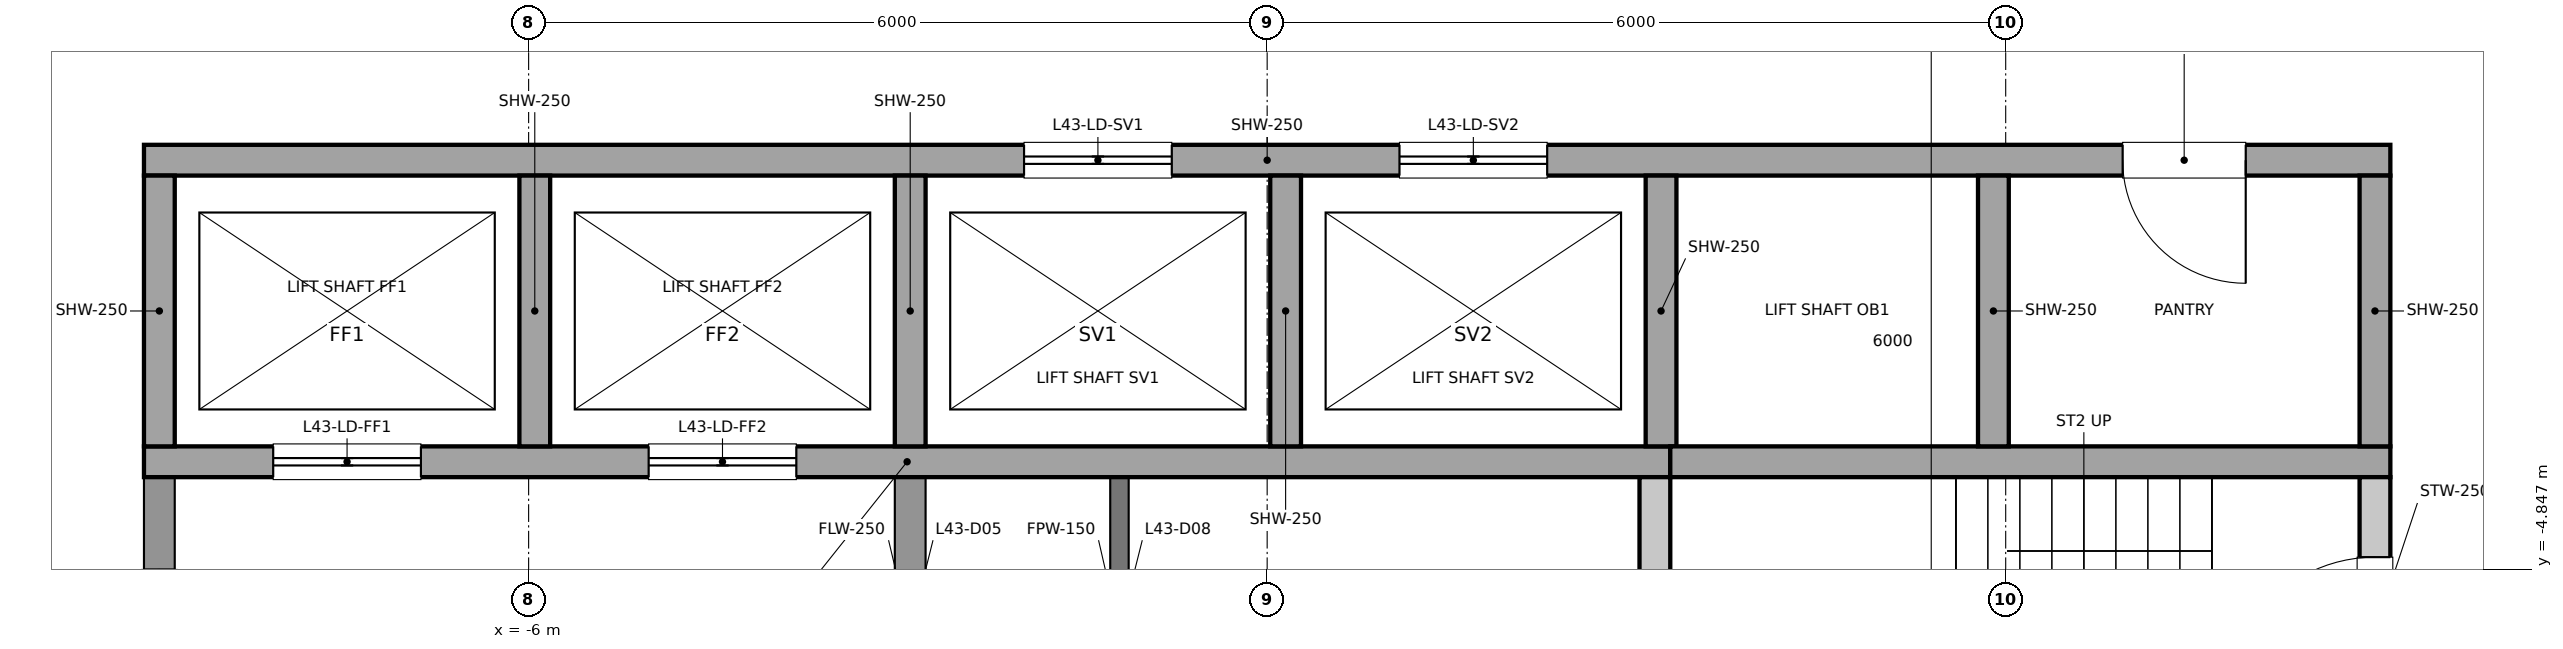
"""IFC4 building model, lengths in metres.
Left out: names, types, materials, properties, quantities, classifications, styles, units other than length and angle.
Written with IfcOpenShell. Run it as: python <this file> out.ifc"""

import sys

from ifc_helpers import new_model, si_unit, direction, frame, frame_2d, origin, place, context, subcontext, project, spatial, rectangle, extrude, element, fill, save


model = new_model("IFC4")
c1 = context("Model", 3, precision=1e-05, world=origin(), true_north=direction((0.0, 1.0)))
c2 = subcontext(c1, "Body", "Model", "MODEL_VIEW")
j1 = project(units=[si_unit("LENGTHUNIT", "METRE"), si_unit("PLANEANGLEUNIT", "RADIAN")], contexts=[c1])
p1 = place(None, origin())
s1 = spatial("IfcSite", under=j1, at=p1, CompositionType="ELEMENT")
p2 = place(p1, origin())
s2 = spatial("IfcBuilding", under=s1, at=p2, CompositionType="ELEMENT")
p3 = place(p2, frame((0.0, 0.0, 203.0)))
s3 = spatial("IfcBuildingStorey", under=s2, at=p3, CompositionType="ELEMENT", Elevation=203.0)
p4 = place(p3, frame((-1.2, -6.6, 0.0), z_axis=(0.0, 0.0, 1.0), x_axis=(0.0, 1.0, 0.0)))
e1 = element("IfcWall", 1, at=p4, inside=s3, PredefinedType="PARTITIONING", context=c2, shape_type="SweptSolid", body=[
    extrude(rectangle(XDim=2.5, YDim=0.15, at=frame_2d((1.25, 0.0))), origin(), (0.0, 0.0, 1.0), 5.7),
])
p5 = place(p4, frame((0.8, 0.0, 0.0)))
e2 = element("IfcOpeningElement", 2, at=p5, cuts=e1, PredefinedType="OPENING", context=c2, shape_type="SweptSolid", body=[
    extrude(rectangle(XDim=0.9, YDim=2.1, at=frame_2d((0.45, 1.05))), frame((0.0, 0.075, 0.0), z_axis=(0.0, -1.0, 0.0), x_axis=(1.0, 0.0, 0.0)), (0.0, 0.0, 1.0), 0.15),
])
p6 = place(p3, frame((9.0, -6.6, 0.0), z_axis=(0.0, 0.0, 1.0), x_axis=(0.0, 1.0, 0.0)))
e3 = element("IfcWall", 3, at=p6, inside=s3, PredefinedType="SOLIDWALL", context=c2, shape_type="SweptSolid", body=[
    extrude(rectangle(XDim=2.5, YDim=0.25, at=frame_2d((1.25, 0.0))), origin(), (0.0, 0.0, 1.0), 5.7),
])
p7 = place(p6, frame((0.65, 0.0, 0.0)))
e4 = element("IfcOpeningElement", 4, at=p7, cuts=e3, PredefinedType="OPENING", context=c2, shape_type="SweptSolid", body=[
    extrude(rectangle(XDim=1.2, YDim=2.1, at=frame_2d((0.6, 1.05))), frame((0.0, 0.125, 0.0), z_axis=(0.0, -1.0, 0.0), x_axis=(1.0, 0.0, 0.0)), (0.0, 0.0, 1.0), 0.25),
])
p8 = place(p3, frame((-9.0, -6.6, 0.0), z_axis=(0.0, 0.0, 1.0), x_axis=(0.0, 1.0, 0.0)))
e5 = element("IfcWall", 5, at=p8, inside=s3, PredefinedType="PARTITIONING", context=c2, shape_type="SweptSolid", body=[
    extrude(rectangle(XDim=2.5, YDim=0.25, at=frame_2d((1.25, 0.0))), origin(), (0.0, 0.0, 1.0), 5.7),
])
p9 = place(p8, frame((0.75, 0.0, 0.0)))
e6 = element("IfcOpeningElement", 6, at=p9, cuts=e5, PredefinedType="OPENING", context=c2, shape_type="SweptSolid", body=[
    extrude(rectangle(XDim=1.0, YDim=2.1, at=frame_2d((0.5, 1.05))), frame((0.0, 0.125, 0.0), z_axis=(0.0, -1.0, 0.0), x_axis=(1.0, 0.0, 0.0)), (0.0, 0.0, 1.0), 0.25),
])
p10 = place(p3, frame((3.15, -6.6, 0.0), z_axis=(0.0, 0.0, 1.0), x_axis=(0.0, 1.0, 0.0)))
e7 = element("IfcWall", 7, at=p10, inside=s3, PredefinedType="SOLIDWALL", context=c2, shape_type="SweptSolid", body=[
    extrude(rectangle(XDim=2.5, YDim=0.25, at=frame_2d((1.25, 0.0))), origin(), (0.0, 0.0, 1.0), 5.7),
])
p11 = place(p3, frame((-2.9, -6.6, 0.0), z_axis=(0.0, 0.0, 1.0), x_axis=(0.0, 1.0, 0.0)))
e8 = element("IfcWall", 8, at=p11, inside=s3, PredefinedType="PARTITIONING", context=c2, shape_type="SweptSolid", body=[
    extrude(rectangle(XDim=2.5, YDim=0.25, at=frame_2d((1.25, 0.0))), origin(), (0.0, 0.0, 1.0), 5.7),
])
p12 = place(p11, frame((0.8, 0.0, 0.0)))
e9 = element("IfcOpeningElement", 9, at=p12, cuts=e8, PredefinedType="OPENING", context=c2, shape_type="SweptSolid", body=[
    extrude(rectangle(XDim=0.9, YDim=2.1, at=frame_2d((0.45, 1.05))), frame((0.0, 0.125, 0.0), z_axis=(0.0, -1.0, 0.0), x_axis=(1.0, 0.0, 0.0)), (0.0, 0.0, 1.0), 0.25),
])
p13 = place(p3, frame((-9.125, -1.525, 0.0), z_axis=(0.0, 0.0, 1.0), x_axis=(1.0, 0.0, 0.0)))
e10 = element("IfcWall", 10, at=p13, inside=s3, PredefinedType="SOLIDWALL", context=c2, shape_type="SweptSolid", body=[
    extrude(rectangle(XDim=18.25, YDim=0.25, at=frame_2d((9.125, 0.0))), origin(), (0.0, 0.0, 1.0), 5.7),
])
p14 = place(p13, frame((7.15, 0.0, 0.0)))
e11 = element("IfcOpeningElement", 11, at=p14, cuts=e10, PredefinedType="OPENING", context=c2, shape_type="SweptSolid", body=[
    extrude(rectangle(XDim=1.2, YDim=2.1, at=frame_2d((0.6, 1.05))), frame((0.0, 0.125, 0.0), z_axis=(0.0, -1.0, 0.0), x_axis=(1.0, 0.0, 0.0)), (0.0, 0.0, 1.0), 0.25),
])
p15 = place(p13, frame((10.2, 0.0, 0.0)))
e12 = element("IfcOpeningElement", 12, at=p15, cuts=e10, PredefinedType="OPENING", context=c2, shape_type="SweptSolid", body=[
    extrude(rectangle(XDim=1.2, YDim=2.1, at=frame_2d((0.6, 1.05))), frame((0.0, 0.125, 0.0), z_axis=(0.0, -1.0, 0.0), x_axis=(1.0, 0.0, 0.0)), (0.0, 0.0, 1.0), 0.25),
])
p16 = place(p13, frame((16.075, 0.0, 0.0)))
e13 = element("IfcOpeningElement", 13, at=p16, cuts=e10, PredefinedType="OPENING", context=c2, shape_type="SweptSolid", body=[
    extrude(rectangle(XDim=1.0, YDim=2.1, at=frame_2d((0.5, 1.05))), frame((0.0, 0.125, 0.0), z_axis=(0.0, -1.0, 0.0), x_axis=(1.0, 0.0, 0.0)), (0.0, 0.0, 1.0), 0.25),
])
p17 = place(p3, frame((-9.125, -3.975, 0.0), z_axis=(0.0, 0.0, 1.0), x_axis=(1.0, 0.0, 0.0)))
e14 = element("IfcWall", 14, at=p17, inside=s3, PredefinedType="SOLIDWALL", context=c2, shape_type="SweptSolid", body=[
    extrude(rectangle(XDim=12.4, YDim=0.25, at=frame_2d((6.2, 0.0))), origin(), (0.0, 0.0, 1.0), 5.7),
])
p18 = place(p17, frame((1.05, 0.0, 0.0)))
e15 = element("IfcOpeningElement", 15, at=p18, cuts=e14, PredefinedType="OPENING", context=c2, shape_type="SweptSolid", body=[
    extrude(rectangle(XDim=1.2, YDim=2.1, at=frame_2d((0.6, 1.05))), frame((0.0, 0.125, 0.0), z_axis=(0.0, -1.0, 0.0), x_axis=(1.0, 0.0, 0.0)), (0.0, 0.0, 1.0), 0.25),
])
p19 = place(p17, frame((4.1, 0.0, 0.0)))
e16 = element("IfcOpeningElement", 16, at=p19, cuts=e14, PredefinedType="OPENING", context=c2, shape_type="SweptSolid", body=[
    extrude(rectangle(XDim=1.2, YDim=2.1, at=frame_2d((0.6, 1.05))), frame((0.0, 0.125, 0.0), z_axis=(0.0, -1.0, 0.0), x_axis=(1.0, 0.0, 0.0)), (0.0, 0.0, 1.0), 0.25),
])
p20 = place(p3, frame((3.275, -3.975, 0.0), z_axis=(0.0, 0.0, 1.0), x_axis=(1.0, 0.0, 0.0)))
e17 = element("IfcWall", 17, at=p20, inside=s3, PredefinedType="SOLIDWALL", context=c2, shape_type="SweptSolid", body=[
    extrude(rectangle(XDim=5.85, YDim=0.25, at=frame_2d((2.925, 0.0))), origin(), (0.0, 0.0, 1.0), 5.7),
])
for number, where, z_axis, x_axis in (
    (18, (-9.0, -3.85, 0.0), (0.0, 0.0, 1.0), (0.0, 1.0, 0.0)),
    (19, (-5.95, -3.85, 0.0), (0.0, 0.0, 1.0), (0.0, 1.0, 0.0)),
    (20, (-2.9, -3.85, 0.0), (0.0, 0.0, 1.0), (0.0, 1.0, 0.0)),
    (21, (0.15, -3.85, 0.0), (0.0, 0.0, 1.0), (0.0, 1.0, 0.0)),
    (22, (3.2, -3.85, 0.0), (0.0, 0.0, 1.0), (0.0, 1.0, 0.0)),
    (23, (5.9, -3.85, 0.0), (0.0, 0.0, 1.0), (0.0, 1.0, 0.0)),
    (24, (9.0, -3.85, 0.0), (0.0, 0.0, 1.0), (0.0, 1.0, 0.0)),
):
    element("IfcWall", number, at=place(p3, frame(where, z_axis=z_axis, x_axis=x_axis)), inside=s3, PredefinedType="SOLIDWALL", context=c2, shape_type="SweptSolid", body=[
        extrude(rectangle(XDim=2.2, YDim=0.25, at=frame_2d((1.1, 0.0))), origin(), (0.0, 0.0, 1.0), 5.7),
    ])
p21 = place(p18, origin())
e25 = element("IfcDoor", 25, at=p21, inside=s3, OperationType="DOUBLE_DOOR_SLIDING", PredefinedType="DOOR", context=c2, shape_type="SweptSolid", body=[
    extrude(rectangle(XDim=1.2, YDim=2.1, at=frame_2d((0.6, 1.05))), frame((0.0, 0.025, 0.0), z_axis=(0.0, -1.0, 0.0), x_axis=(1.0, 0.0, 0.0)), (0.0, 0.0, 1.0), 0.05),
])
fill(e15, e25)
p22 = place(p19, origin())
e26 = element("IfcDoor", 26, at=p22, inside=s3, OperationType="DOUBLE_DOOR_SLIDING", PredefinedType="DOOR", context=c2, shape_type="SweptSolid", body=[
    extrude(rectangle(XDim=1.2, YDim=2.1, at=frame_2d((0.6, 1.05))), frame((0.0, 0.025, 0.0), z_axis=(0.0, -1.0, 0.0), x_axis=(1.0, 0.0, 0.0)), (0.0, 0.0, 1.0), 0.05),
])
fill(e16, e26)
p23 = place(p14, origin())
e27 = element("IfcDoor", 27, at=p23, inside=s3, OperationType="DOUBLE_DOOR_SLIDING", PredefinedType="DOOR", context=c2, shape_type="SweptSolid", body=[
    extrude(rectangle(XDim=1.2, YDim=2.1, at=frame_2d((0.6, 1.05))), frame((0.0, 0.025, 0.0), z_axis=(0.0, -1.0, 0.0), x_axis=(1.0, 0.0, 0.0)), (0.0, 0.0, 1.0), 0.05),
])
fill(e11, e27)
p24 = place(p15, origin())
e28 = element("IfcDoor", 28, at=p24, inside=s3, OperationType="DOUBLE_DOOR_SLIDING", PredefinedType="DOOR", context=c2, shape_type="SweptSolid", body=[
    extrude(rectangle(XDim=1.2, YDim=2.1, at=frame_2d((0.6, 1.05))), frame((0.0, 0.025, 0.0), z_axis=(0.0, -1.0, 0.0), x_axis=(1.0, 0.0, 0.0)), (0.0, 0.0, 1.0), 0.05),
])
fill(e12, e28)
p25 = place(p7, origin())
e29 = element("IfcDoor", 29, at=p25, inside=s3, OperationType="SINGLE_SWING_LEFT", PredefinedType="DOOR", context=c2, shape_type="SweptSolid", body=[
    extrude(rectangle(XDim=1.2, YDim=2.1, at=frame_2d((0.6, 1.05))), frame((0.0, 0.025, 0.0), z_axis=(0.0, -1.0, 0.0), x_axis=(1.0, 0.0, 0.0)), (0.0, 0.0, 1.0), 0.05),
])
fill(e4, e29)
p26 = place(p16, origin())
e30 = element("IfcDoor", 30, at=p26, inside=s3, OperationType="SINGLE_SWING_RIGHT", PredefinedType="DOOR", context=c2, shape_type="SweptSolid", body=[
    extrude(rectangle(XDim=1.0, YDim=2.1, at=frame_2d((0.5, 1.05))), frame((0.0, 0.025, 0.0), z_axis=(0.0, -1.0, 0.0), x_axis=(1.0, 0.0, 0.0)), (0.0, 0.0, 1.0), 0.05),
])
fill(e13, e30)
save(model, sys.argv[1])
